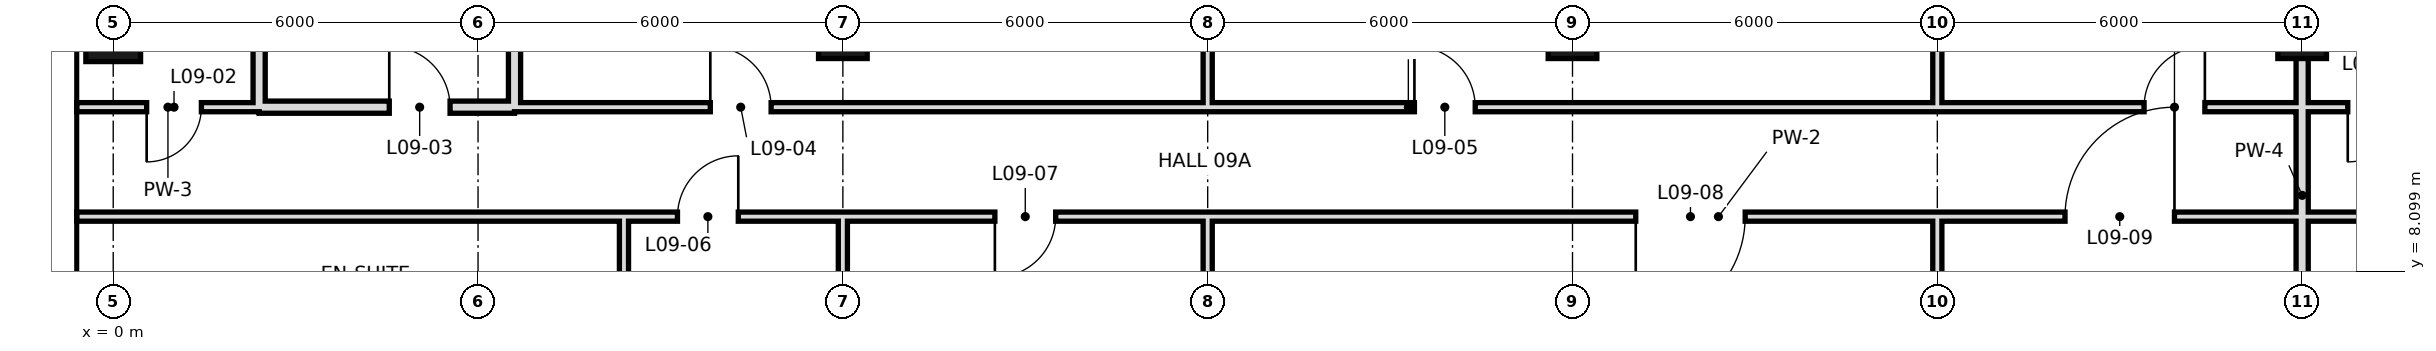
"""IFC4 building model, lengths in metres.
Left out: names, types, materials, properties, quantities, classifications, styles, units other than length and angle.
Written with IfcOpenShell. Run it as: python <this file> out.ifc"""

import sys

from ifc_helpers import new_model, si_unit, direction, frame, frame_2d, origin, origin_2d, place, context, subcontext, project, spatial, rectangle, hollow_rectangle, extrude, element, fill, save


model = new_model("IFC4")
c1 = context("Model", 3, precision=1e-05, world=origin(), true_north=direction((0.0, 1.0)))
c2 = subcontext(c1, "Body", "Model", "MODEL_VIEW")
j1 = project(units=[si_unit("LENGTHUNIT", "METRE"), si_unit("PLANEANGLEUNIT", "RADIAN")], contexts=[c1])
p1 = place(None, origin())
s1 = spatial("IfcSite", under=j1, at=p1, CompositionType="ELEMENT")
p2 = place(p1, origin())
s2 = spatial("IfcBuilding", under=s1, at=p2, CompositionType="ELEMENT")
p3 = place(p2, frame((0.0, 0.0, 53.4)))
s3 = spatial("IfcBuildingStorey", under=s2, at=p3, CompositionType="ELEMENT", Elevation=53.4)
p4 = place(p3, frame((0.0, 12.0, 0.0), z_axis=(0.0, 0.0, 1.0), x_axis=(1.0, 0.0, 0.0)))
e1 = element("IfcColumn", 1, at=p4, inside=s3, PredefinedType="COLUMN", context=c2, shape_type="SweptSolid", body=[
    extrude(hollow_rectangle(XDim=0.9, YDim=0.9, WallThickness=0.045, at=origin_2d()), origin(), (0.0, 0.0, 1.0), 3.6),
])
for number, where, z_axis, x_axis in (
    (2, (12.0, 12.0, 0.0), (0.0, 0.0, 1.0), (1.0, 0.0, 0.0)),
    (3, (24.0, 12.0, 0.0), (0.0, 0.0, 1.0), (1.0, 0.0, 0.0)),
    (4, (36.0, 12.0, 0.0), (0.0, 0.0, 1.0), (1.0, 0.0, 0.0)),
):
    element("IfcColumn", number, at=place(p3, frame(where, z_axis=z_axis, x_axis=x_axis)), inside=s3, PredefinedType="COLUMN", context=c2, shape_type="SweptSolid", body=[
        extrude(hollow_rectangle(XDim=0.8, YDim=0.8, WallThickness=0.04, at=origin_2d()), origin(), (0.0, 0.0, 1.0), 3.6),
    ])
p5 = place(p3, frame((12.0, 0.0, 0.0), z_axis=(0.0, 0.0, 1.0), x_axis=(0.0, 1.0, 0.0)))
e5 = element("IfcWall", 5, at=p5, inside=s3, PredefinedType="PARTITIONING", context=c2, shape_type="SweptSolid", body=[
    extrude(rectangle(XDim=9.0, YDim=0.15, at=frame_2d((4.5, 0.0))), origin(), (0.0, 0.0, 1.0), 2.72),
])
p6 = place(p3, frame((18.0, -0.6, 0.0), z_axis=(0.0, 0.0, 1.0), x_axis=(0.0, 1.0, 0.0)))
e6 = element("IfcWall", 6, at=p6, inside=s3, PredefinedType="PARTITIONING", context=c2, shape_type="SweptSolid", body=[
    extrude(rectangle(XDim=9.6, YDim=0.15, at=frame_2d((4.8, 0.0))), origin(), (0.0, 0.0, 1.0), 2.72),
])
p7 = place(p3, frame((18.0, 10.8, 0.0), z_axis=(0.0, 0.0, 1.0), x_axis=(0.0, 1.0, 0.0)))
e7 = element("IfcWall", 7, at=p7, inside=s3, PredefinedType="PARTITIONING", context=c2, shape_type="SweptSolid", body=[
    extrude(rectangle(XDim=7.9, YDim=0.15, at=frame_2d((3.95, 0.0))), origin(), (0.0, 0.0, 1.0), 2.72),
])
p8 = place(p3, frame((2.4, 10.8, 0.0), z_axis=(0.0, 0.0, 1.0), x_axis=(0.0, 1.0, 0.0)))
e8 = element("IfcWall", 8, at=p8, inside=s3, PredefinedType="SOLIDWALL", context=c2, shape_type="SweptSolid", body=[
    extrude(rectangle(XDim=7.2, YDim=0.2, at=frame_2d((3.6, 0.0))), origin(), (0.0, 0.0, 1.0), 2.72),
])
p9 = place(p3, frame((30.0, -0.6, 0.0), z_axis=(0.0, 0.0, 1.0), x_axis=(0.0, 1.0, 0.0)))
e9 = element("IfcWall", 9, at=p9, inside=s3, PredefinedType="PARTITIONING", context=c2, shape_type="SweptSolid", body=[
    extrude(rectangle(XDim=9.6, YDim=0.15, at=frame_2d((4.8, 0.0))), origin(), (0.0, 0.0, 1.0), 2.72),
])
p10 = place(p3, frame((30.0, 10.8, 0.0), z_axis=(0.0, 0.0, 1.0), x_axis=(0.0, 1.0, 0.0)))
e10 = element("IfcWall", 10, at=p10, inside=s3, PredefinedType="PARTITIONING", context=c2, shape_type="SweptSolid", body=[
    extrude(rectangle(XDim=7.9, YDim=0.15, at=frame_2d((3.95, 0.0))), origin(), (0.0, 0.0, 1.0), 2.72),
])
p11 = place(p3, frame((36.0, 0.0, 0.0), z_axis=(0.0, 0.0, 1.0), x_axis=(0.0, 1.0, 0.0)))
e11 = element("IfcWall", 11, at=p11, inside=s3, PredefinedType="SOLIDWALL", context=c2, shape_type="SweptSolid", body=[
    extrude(rectangle(XDim=18.7, YDim=0.2, at=frame_2d((9.35, 0.0))), origin(), (0.0, 0.0, 1.0), 2.72),
])
p12 = place(p3, frame((6.6, 10.8, 0.0), z_axis=(0.0, 0.0, 1.0), x_axis=(0.0, 1.0, 0.0)))
e12 = element("IfcWall", 12, at=p12, inside=s3, PredefinedType="SOLIDWALL", context=c2, shape_type="SweptSolid", body=[
    extrude(rectangle(XDim=7.9, YDim=0.2, at=frame_2d((3.95, 0.0))), origin(), (0.0, 0.0, 1.0), 2.72),
])
p13 = place(p3, frame((8.4, 6.0, 0.0), z_axis=(0.0, 0.0, 1.0), x_axis=(0.0, 1.0, 0.0)))
e13 = element("IfcWall", 13, at=p13, inside=s3, PredefinedType="PARTITIONING", context=c2, shape_type="SweptSolid", body=[
    extrude(rectangle(XDim=3.0, YDim=0.15, at=frame_2d((1.5, 0.0))), origin(), (0.0, 0.0, 1.0), 3.42),
])
p14 = place(p3, frame((2.4, 10.8, 0.0), z_axis=(0.0, 0.0, 1.0), x_axis=(1.0, 0.0, 0.0)))
e14 = element("IfcWall", 14, at=p14, inside=s3, PredefinedType="SOLIDWALL", context=c2, shape_type="SweptSolid", body=[
    extrude(rectangle(XDim=4.2, YDim=0.2, at=frame_2d((2.1, 0.0))), origin(), (0.0, 0.0, 1.0), 2.72),
])
p15 = place(p14, frame((2.14, 0.0, 0.0)))
e15 = element("IfcOpeningElement", 15, at=p15, cuts=e14, PredefinedType="OPENING", context=c2, shape_type="SweptSolid", body=[
    extrude(rectangle(XDim=1.0, YDim=2.4, at=frame_2d((0.5, 1.2))), frame((0.0, 0.11, 0.0), z_axis=(0.0, -1.0, 0.0), x_axis=(1.0, 0.0, 0.0)), (0.0, 0.0, 1.0), 0.22),
])
p16 = place(p3, frame((6.6, 10.8, 0.0), z_axis=(0.0, 0.0, 1.0), x_axis=(1.0, 0.0, 0.0)))
e16 = element("IfcWall", 16, at=p16, inside=s3, PredefinedType="PARTITIONING", context=c2, shape_type="SweptSolid", body=[
    extrude(rectangle(XDim=29.4, YDim=0.15, at=frame_2d((14.7, 0.0))), origin(), (0.0, 0.0, 1.0), 3.42),
])
p17 = place(p16, frame((26.8, 0.0, 0.0)))
e17 = element("IfcOpeningElement", 17, at=p17, cuts=e16, PredefinedType="OPENING", context=c2, shape_type="SweptSolid", body=[
    extrude(rectangle(XDim=1.0, YDim=2.4, at=frame_2d((0.5, 1.2))), frame((0.0, 0.085, 0.0), z_axis=(0.0, -1.0, 0.0), x_axis=(1.0, 0.0, 0.0)), (0.0, 0.0, 1.0), 0.17),
])
p18 = place(p16, frame((3.22, 0.0, 0.0)))
e18 = element("IfcOpeningElement", 18, at=p18, cuts=e16, PredefinedType="OPENING", context=c2, shape_type="SweptSolid", body=[
    extrude(rectangle(XDim=1.0, YDim=2.4, at=frame_2d((0.5, 1.2))), frame((0.0, 0.085, 0.0), z_axis=(0.0, -1.0, 0.0), x_axis=(1.0, 0.0, 0.0)), (0.0, 0.0, 1.0), 0.17),
])
p19 = place(p16, frame((14.8, 0.0, 0.0)))
e19 = element("IfcOpeningElement", 19, at=p19, cuts=e16, PredefinedType="OPENING", context=c2, shape_type="SweptSolid", body=[
    extrude(rectangle(XDim=1.0, YDim=2.4, at=frame_2d((0.5, 1.2))), frame((0.0, 0.085, 0.0), z_axis=(0.0, -1.0, 0.0), x_axis=(1.0, 0.0, 0.0)), (0.0, 0.0, 1.0), 0.17),
])
p20 = place(p3, frame((-0.6, 10.8, 0.0), z_axis=(0.0, 0.0, 1.0), x_axis=(1.0, 0.0, 0.0)))
e20 = element("IfcWall", 20, at=p20, inside=s3, PredefinedType="PARTITIONING", context=c2, shape_type="SweptSolid", body=[
    extrude(rectangle(XDim=3.0, YDim=0.15, at=frame_2d((1.5, 0.0))), origin(), (0.0, 0.0, 1.0), 3.42),
])
p21 = place(p20, frame((1.15, 0.0, 0.0)))
e21 = element("IfcOpeningElement", 21, at=p21, cuts=e20, PredefinedType="OPENING", context=c2, shape_type="SweptSolid", body=[
    extrude(rectangle(XDim=0.9, YDim=2.4, at=frame_2d((0.45, 1.2))), frame((0.0, 0.085, 0.0), z_axis=(0.0, -1.0, 0.0), x_axis=(1.0, 0.0, 0.0)), (0.0, 0.0, 1.0), 0.17),
])
p22 = place(p3, frame((36.0, 10.8, 0.0), z_axis=(0.0, 0.0, 1.0), x_axis=(1.0, 0.0, 0.0)))
e22 = element("IfcWall", 22, at=p22, inside=s3, PredefinedType="PARTITIONING", context=c2, shape_type="SweptSolid", body=[
    extrude(rectangle(XDim=2.4, YDim=0.15, at=frame_2d((1.2, 0.0))), origin(), (0.0, 0.0, 1.0), 3.42),
])
p23 = place(p22, frame((0.75, 0.0, 0.0)))
e23 = element("IfcOpeningElement", 23, at=p23, cuts=e22, PredefinedType="OPENING", context=c2, shape_type="SweptSolid", body=[
    extrude(rectangle(XDim=0.9, YDim=2.4, at=frame_2d((0.45, 1.2))), frame((0.0, 0.085, 0.0), z_axis=(0.0, -1.0, 0.0), x_axis=(1.0, 0.0, 0.0)), (0.0, 0.0, 1.0), 0.17),
])
p24 = place(p3, frame((8.4, 9.0, 0.0), z_axis=(0.0, 0.0, 1.0), x_axis=(1.0, 0.0, 0.0)))
e24 = element("IfcWall", 24, at=p24, inside=s3, PredefinedType="PARTITIONING", context=c2, shape_type="SweptSolid", body=[
    extrude(rectangle(XDim=36.0, YDim=0.15, at=frame_2d((18.0, 0.0))), origin(), (0.0, 0.0, 1.0), 3.42),
])
p25 = place(p24, frame((0.88, 0.0, 0.0)))
e25 = element("IfcOpeningElement", 25, at=p25, cuts=e24, PredefinedType="OPENING", context=c2, shape_type="SweptSolid", body=[
    extrude(rectangle(XDim=1.0, YDim=2.4, at=frame_2d((0.5, 1.2))), frame((0.0, 0.085, 0.0), z_axis=(0.0, -1.0, 0.0), x_axis=(1.0, 0.0, 0.0)), (0.0, 0.0, 1.0), 0.17),
])
p26 = place(p24, frame((6.1, 0.0, 0.0)))
e26 = element("IfcOpeningElement", 26, at=p26, cuts=e24, PredefinedType="OPENING", context=c2, shape_type="SweptSolid", body=[
    extrude(rectangle(XDim=1.0, YDim=2.4, at=frame_2d((0.5, 1.2))), frame((0.0, 0.085, 0.0), z_axis=(0.0, -1.0, 0.0), x_axis=(1.0, 0.0, 0.0)), (0.0, 0.0, 1.0), 0.17),
])
p27 = place(p24, frame((16.64, 0.0, 0.0)))
e27 = element("IfcOpeningElement", 27, at=p27, cuts=e24, PredefinedType="OPENING", context=c2, shape_type="SweptSolid", body=[
    extrude(rectangle(XDim=1.8, YDim=2.4, at=frame_2d((0.9, 1.2))), frame((0.0, 0.085, 0.0), z_axis=(0.0, -1.0, 0.0), x_axis=(1.0, 0.0, 0.0)), (0.0, 0.0, 1.0), 0.17),
])
p28 = place(p24, frame((23.7, 0.0, 0.0)))
e28 = element("IfcOpeningElement", 28, at=p28, cuts=e24, PredefinedType="OPENING", context=c2, shape_type="SweptSolid", body=[
    extrude(rectangle(XDim=1.8, YDim=2.4, at=frame_2d((0.9, 1.2))), frame((0.0, 0.085, 0.0), z_axis=(0.0, -1.0, 0.0), x_axis=(1.0, 0.0, 0.0)), (0.0, 0.0, 1.0), 0.17),
])
p29 = place(p24, frame((30.1, 0.0, 0.0)))
e29 = element("IfcOpeningElement", 29, at=p29, cuts=e24, PredefinedType="OPENING", context=c2, shape_type="SweptSolid", body=[
    extrude(rectangle(XDim=1.0, YDim=2.4, at=frame_2d((0.5, 1.2))), frame((0.0, 0.085, 0.0), z_axis=(0.0, -1.0, 0.0), x_axis=(1.0, 0.0, 0.0)), (0.0, 0.0, 1.0), 0.17),
])
p30 = place(p24, frame((34.12, 0.0, 0.0)))
e30 = element("IfcOpeningElement", 30, at=p30, cuts=e24, PredefinedType="OPENING", context=c2, shape_type="SweptSolid", body=[
    extrude(rectangle(XDim=1.0, YDim=2.4, at=frame_2d((0.5, 1.2))), frame((0.0, 0.085, 0.0), z_axis=(0.0, -1.0, 0.0), x_axis=(1.0, 0.0, 0.0)), (0.0, 0.0, 1.0), 0.17),
])
p31 = place(p3, frame((-0.6, 9.0, 0.0), z_axis=(0.0, 0.0, 1.0), x_axis=(1.0, 0.0, 0.0)))
e31 = element("IfcWall", 31, at=p31, inside=s3, PredefinedType="PARTITIONING", context=c2, shape_type="SweptSolid", body=[
    extrude(rectangle(XDim=9.0, YDim=0.15, at=frame_2d((4.5, 0.0))), origin(), (0.0, 0.0, 1.0), 3.42),
])
p32 = place(p17, frame((1.0, 0.0, 0.0), z_axis=(0.0, 0.0, 1.0), x_axis=(-1.0, 0.0, 0.0)))
e32 = element("IfcDoor", 32, at=p32, inside=s3, OperationType="SINGLE_SWING_LEFT", PredefinedType="DOOR", context=c2, shape_type="SweptSolid", body=[
    extrude(rectangle(XDim=1.0, YDim=2.4, at=frame_2d((0.5, 1.2))), frame((0.0, 0.025, 0.0), z_axis=(0.0, -1.0, 0.0), x_axis=(1.0, 0.0, 0.0)), (0.0, 0.0, 1.0), 0.05),
])
fill(e17, e32)
p33 = place(p21, frame((0.9, 0.0, 0.0), z_axis=(0.0, 0.0, 1.0), x_axis=(-1.0, 0.0, 0.0)))
e33 = element("IfcDoor", 33, at=p33, inside=s3, OperationType="SINGLE_SWING_RIGHT", PredefinedType="DOOR", context=c2, shape_type="SweptSolid", body=[
    extrude(rectangle(XDim=0.9, YDim=2.4, at=frame_2d((0.45, 1.2))), frame((0.0, 0.025, 0.0), z_axis=(0.0, -1.0, 0.0), x_axis=(1.0, 0.0, 0.0)), (0.0, 0.0, 1.0), 0.05),
])
fill(e21, e33)
p34 = place(p15, origin())
e34 = element("IfcDoor", 34, at=p34, inside=s3, OperationType="SINGLE_SWING_LEFT", PredefinedType="DOOR", context=c2, shape_type="SweptSolid", body=[
    extrude(rectangle(XDim=1.0, YDim=2.4, at=frame_2d((0.5, 1.2))), frame((0.0, 0.025, 0.0), z_axis=(0.0, -1.0, 0.0), x_axis=(1.0, 0.0, 0.0)), (0.0, 0.0, 1.0), 0.05),
])
fill(e15, e34)
p35 = place(p18, origin())
e35 = element("IfcDoor", 35, at=p35, inside=s3, OperationType="SINGLE_SWING_LEFT", PredefinedType="DOOR", context=c2, shape_type="SweptSolid", body=[
    extrude(rectangle(XDim=1.0, YDim=2.4, at=frame_2d((0.5, 1.2))), frame((0.0, 0.025, 0.0), z_axis=(0.0, -1.0, 0.0), x_axis=(1.0, 0.0, 0.0)), (0.0, 0.0, 1.0), 0.05),
])
fill(e18, e35)
p36 = place(p19, origin())
e36 = element("IfcDoor", 36, at=p36, inside=s3, OperationType="SINGLE_SWING_LEFT", PredefinedType="DOOR", context=c2, shape_type="SweptSolid", body=[
    extrude(rectangle(XDim=1.0, YDim=2.4, at=frame_2d((0.5, 1.2))), frame((0.0, 0.025, 0.0), z_axis=(0.0, -1.0, 0.0), x_axis=(1.0, 0.0, 0.0)), (0.0, 0.0, 1.0), 0.05),
])
fill(e19, e36)
p37 = place(p25, frame((1.0, 0.0, 0.0), z_axis=(0.0, 0.0, 1.0), x_axis=(-1.0, 0.0, 0.0)))
e37 = element("IfcDoor", 37, at=p37, inside=s3, OperationType="SINGLE_SWING_LEFT", PredefinedType="DOOR", context=c2, shape_type="SweptSolid", body=[
    extrude(rectangle(XDim=1.0, YDim=2.4, at=frame_2d((0.5, 1.2))), frame((0.0, 0.025, 0.0), z_axis=(0.0, -1.0, 0.0), x_axis=(1.0, 0.0, 0.0)), (0.0, 0.0, 1.0), 0.05),
])
fill(e25, e37)
p38 = place(p26, frame((1.0, 0.0, 0.0), z_axis=(0.0, 0.0, 1.0), x_axis=(-1.0, 0.0, 0.0)))
e38 = element("IfcDoor", 38, at=p38, inside=s3, OperationType="SINGLE_SWING_RIGHT", PredefinedType="DOOR", context=c2, shape_type="SweptSolid", body=[
    extrude(rectangle(XDim=1.0, YDim=2.4, at=frame_2d((0.5, 1.2))), frame((0.0, 0.025, 0.0), z_axis=(0.0, -1.0, 0.0), x_axis=(1.0, 0.0, 0.0)), (0.0, 0.0, 1.0), 0.05),
])
fill(e26, e38)
p39 = place(p27, frame((1.8, 0.0, 0.0), z_axis=(0.0, 0.0, 1.0), x_axis=(-1.0, 0.0, 0.0)))
e39 = element("IfcDoor", 39, at=p39, inside=s3, OperationType="SINGLE_SWING_RIGHT", PredefinedType="DOOR", context=c2, shape_type="SweptSolid", body=[
    extrude(rectangle(XDim=1.8, YDim=2.4, at=frame_2d((0.9, 1.2))), frame((0.0, 0.025, 0.0), z_axis=(0.0, -1.0, 0.0), x_axis=(1.0, 0.0, 0.0)), (0.0, 0.0, 1.0), 0.05),
])
fill(e27, e39)
p40 = place(p28, frame((1.8, 0.0, 0.0), z_axis=(0.0, 0.0, 1.0), x_axis=(-1.0, 0.0, 0.0)))
e40 = element("IfcDoor", 40, at=p40, inside=s3, OperationType="SINGLE_SWING_LEFT", PredefinedType="DOOR", context=c2, shape_type="SweptSolid", body=[
    extrude(rectangle(XDim=1.8, YDim=2.4, at=frame_2d((0.9, 1.2))), frame((0.0, 0.025, 0.0), z_axis=(0.0, -1.0, 0.0), x_axis=(1.0, 0.0, 0.0)), (0.0, 0.0, 1.0), 0.05),
])
fill(e28, e40)
p41 = place(p23, frame((0.9, 0.0, 0.0), z_axis=(0.0, 0.0, 1.0), x_axis=(-1.0, 0.0, 0.0)))
e41 = element("IfcDoor", 41, at=p41, inside=s3, OperationType="SINGLE_SWING_RIGHT", PredefinedType="DOOR", context=c2, shape_type="SweptSolid", body=[
    extrude(rectangle(XDim=0.9, YDim=2.4, at=frame_2d((0.45, 1.2))), frame((0.0, 0.025, 0.0), z_axis=(0.0, -1.0, 0.0), x_axis=(1.0, 0.0, 0.0)), (0.0, 0.0, 1.0), 0.05),
])
fill(e23, e41)
save(model, sys.argv[1])
